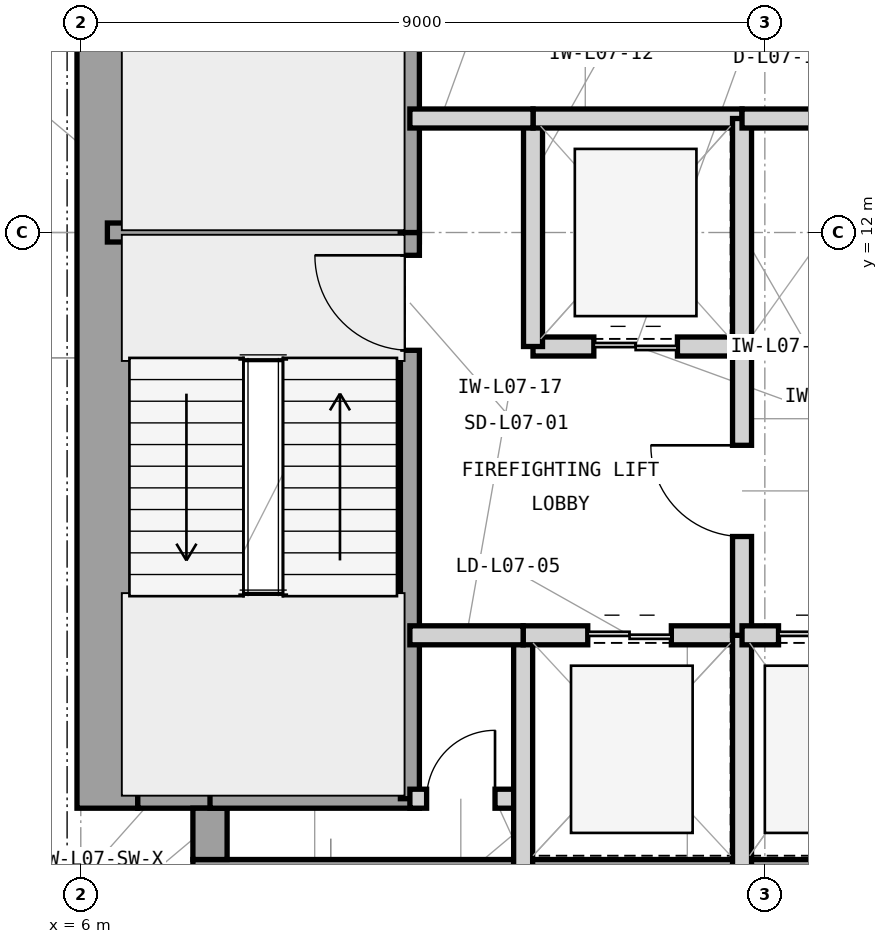
"""IFC4 building model, lengths in metres.
Left out: names, types, materials, properties, quantities, classifications, styles, units other than length and angle.
Written with IfcOpenShell. Run it as: python <this file> out.ifc"""

import sys

from ifc_helpers import new_model, si_unit, direction, frame, frame_2d, origin, place, context, subcontext, project, spatial, rectangle, extrude, element, fill, save


model = new_model("IFC4")
c1 = context("Model", 3, precision=1e-05, world=origin(), true_north=direction((0.0, 1.0)))
c2 = subcontext(c1, "Body", "Model", "MODEL_VIEW")
j1 = project(units=[si_unit("LENGTHUNIT", "METRE"), si_unit("PLANEANGLEUNIT", "RADIAN")], contexts=[c1])
p1 = place(None, origin())
s1 = spatial("IfcSite", under=j1, at=p1, CompositionType="ELEMENT")
p2 = place(p1, origin())
s2 = spatial("IfcBuilding", under=s1, at=p2, CompositionType="ELEMENT")
p3 = place(p2, frame((0.0, 0.0, 34.2)))
s3 = spatial("IfcBuildingStorey", under=s2, at=p3, CompositionType="ELEMENT", Elevation=34.2)
p4 = place(p3, frame((7.475, 3.35, 0.0), z_axis=(0.0, 0.0, 1.0), x_axis=(1.0, 0.0, 0.0)))
e1 = element("IfcWall", 1, at=p4, inside=s3, PredefinedType="SHEAR", context=c2, shape_type="SweptSolid", body=[
    extrude(rectangle(XDim=16.575, YDim=0.8, at=frame_2d((8.288, 0.0))), origin(), (0.0, 0.0, 1.0), 4.2),
])
p5 = place(p3, frame((6.35, 4.425, 0.0), z_axis=(0.0, 0.0, 1.0), x_axis=(0.0, 1.0, 0.0)))
e2 = element("IfcWall", 2, at=p5, inside=s3, PredefinedType="SHEAR", context=c2, shape_type="SweptSolid", body=[
    extrude(rectangle(XDim=15.15, YDim=0.8, at=frame_2d((7.575, 0.0))), origin(), (0.0, 0.0, 1.0), 4.2),
])
p6 = place(p3, frame((6.75, 4.65, 0.0), z_axis=(0.0, 0.0, 1.0), x_axis=(1.0, 0.0, 0.0)))
e3 = element("IfcWall", 3, at=p6, inside=s3, PredefinedType="SHEAR", context=c2, shape_type="SweptSolid", body=[
    extrude(rectangle(XDim=1.175, YDim=0.45, at=frame_2d((0.587, 0.0))), origin(), (0.0, 0.0, 1.0), 4.2),
])
p7 = place(p3, frame((7.7, 3.75, 0.0), z_axis=(0.0, 0.0, 1.0), x_axis=(0.0, 1.0, 0.0)))
e4 = element("IfcWall", 4, at=p7, inside=s3, PredefinedType="SHEAR", context=c2, shape_type="SweptSolid", body=[
    extrude(rectangle(XDim=0.675, YDim=0.45, at=frame_2d((0.337, 0.0))), origin(), (0.0, 0.0, 1.0), 4.2),
])
p8 = place(p3, frame((6.35, 12.0, 0.0), z_axis=(0.0, 0.0, 1.0), x_axis=(1.0, 0.0, 0.0)))
e5 = element("IfcWall", 5, at=p8, inside=s3, PredefinedType="SHEAR", context=c2, shape_type="SweptSolid", body=[
    extrude(rectangle(XDim=4.105, YDim=0.25, at=frame_2d((2.052, 0.0))), origin(), (0.0, 0.0, 1.0), 4.2),
])
p9 = place(p3, frame((7.7, 4.55, 0.0), z_axis=(0.0, 0.0, 1.0), x_axis=(1.0, 0.0, 0.0)))
e6 = element("IfcWall", 6, at=p9, inside=s3, PredefinedType="SHEAR", context=c2, shape_type="SweptSolid", body=[
    extrude(rectangle(XDim=2.755, YDim=0.25, at=frame_2d((1.377, 0.0))), origin(), (0.0, 0.0, 1.0), 4.2),
])
p10 = place(p3, frame((10.33, 4.55, 0.0), z_axis=(0.0, 0.0, 1.0), x_axis=(0.0, 1.0, 0.0)))
e7 = element("IfcWall", 7, at=p10, inside=s3, PredefinedType="SHEAR", context=c2, shape_type="SweptSolid", body=[
    extrude(rectangle(XDim=7.45, YDim=0.25, at=frame_2d((3.725, 0.0))), origin(), (0.0, 0.0, 1.0), 4.2),
])
p11 = place(p10, frame((5.9, 0.0, 0.0)))
e8 = element("IfcOpeningElement", 8, at=p11, cuts=e7, PredefinedType="OPENING", context=c2, shape_type="SweptSolid", body=[
    extrude(rectangle(XDim=1.25, YDim=2.2, at=frame_2d((0.625, 1.1))), frame((0.0, 0.135, 0.0), z_axis=(0.0, -1.0, 0.0), x_axis=(1.0, 0.0, 0.0)), (0.0, 0.0, 1.0), 0.27),
])
p12 = place(p3, frame((10.33, 12.0, 0.0), z_axis=(0.0, 0.0, 1.0), x_axis=(0.0, 1.0, 0.0)))
e9 = element("IfcWall", 9, at=p12, inside=s3, PredefinedType="SHEAR", context=c2, shape_type="SweptSolid", body=[
    extrude(rectangle(XDim=7.45, YDim=0.25, at=frame_2d((3.725, 0.0))), origin(), (0.0, 0.0, 1.0), 4.2),
])
p13 = place(p12, frame((5.85, 0.0, 0.0)))
e10 = element("IfcOpeningElement", 10, at=p13, cuts=e9, PredefinedType="OPENING", context=c2, shape_type="SweptSolid", body=[
    extrude(rectangle(XDim=1.25, YDim=2.2, at=frame_2d((0.625, 1.1))), frame((0.0, 0.135, 0.0), z_axis=(0.0, -1.0, 0.0), x_axis=(1.0, 0.0, 0.0)), (0.0, 0.0, 1.0), 0.27),
])
p14 = place(p3, frame((10.33, 4.55, 0.0), z_axis=(0.0, 0.0, 1.0), x_axis=(1.0, 0.0, 0.0)))
e11 = element("IfcWall", 11, at=p14, inside=s3, PredefinedType="PARTITIONING", context=c2, shape_type="SweptSolid", body=[
    extrude(rectangle(XDim=1.49, YDim=0.25, at=frame_2d((0.745, 0.0))), origin(), (0.0, 0.0, 1.0), 3.97),
])
p15 = place(p14, frame((0.22, 0.0, 0.0)))
e12 = element("IfcOpeningElement", 12, at=p15, cuts=e11, PredefinedType="OPENING", context=c2, shape_type="SweptSolid", body=[
    extrude(rectangle(XDim=0.9, YDim=2.1, at=frame_2d((0.45, 1.05))), frame((0.0, 0.135, 0.0), z_axis=(0.0, -1.0, 0.0), x_axis=(1.0, 0.0, 0.0)), (0.0, 0.0, 1.0), 0.27),
])
p16 = place(p3, frame((11.82, 3.35, 0.0), z_axis=(0.0, 0.0, 1.0), x_axis=(0.0, 1.0, 0.0)))
e13 = element("IfcWall", 13, at=p16, inside=s3, PredefinedType="PARTITIONING", context=c2, shape_type="SweptSolid", body=[
    extrude(rectangle(XDim=3.35, YDim=0.25, at=frame_2d((1.675, 0.0))), origin(), (0.0, 0.0, 1.0), 3.97),
])
p17 = place(p3, frame((11.82, 6.7, 0.0), z_axis=(0.0, 0.0, 1.0), x_axis=(1.0, 0.0, 0.0)))
e14 = element("IfcWall", 14, at=p17, inside=s3, PredefinedType="PARTITIONING", context=c2, shape_type="SweptSolid", body=[
    extrude(rectangle(XDim=2.88, YDim=0.25, at=frame_2d((1.44, 0.0))), origin(), (0.0, 0.0, 1.0), 3.426),
])
p18 = place(p17, frame((0.85, 0.0, 0.0)))
e15 = element("IfcOpeningElement", 15, at=p18, cuts=e14, PredefinedType="OPENING", context=c2, shape_type="SweptSolid", body=[
    extrude(rectangle(XDim=1.1, YDim=2.25, at=frame_2d((0.55, 1.125))), frame((0.0, 0.135, 0.0), z_axis=(0.0, -1.0, 0.0), x_axis=(1.0, 0.0, 0.0)), (0.0, 0.0, 1.0), 0.27),
])
p19 = place(p3, frame((14.7, 3.35, 0.0), z_axis=(0.0, 0.0, 1.0), x_axis=(0.0, 1.0, 0.0)))
e16 = element("IfcWall", 16, at=p19, inside=s3, PredefinedType="PARTITIONING", context=c2, shape_type="SweptSolid", body=[
    extrude(rectangle(XDim=3.35, YDim=0.25, at=frame_2d((1.675, 0.0))), origin(), (0.0, 0.0, 1.0), 3.97),
])
p20 = place(p3, frame((11.95, 10.5, 0.0), z_axis=(0.0, 0.0, 1.0), x_axis=(1.0, 0.0, 0.0)))
e17 = element("IfcWall", 17, at=p20, inside=s3, PredefinedType="PARTITIONING", context=c2, shape_type="SweptSolid", body=[
    extrude(rectangle(XDim=2.75, YDim=0.25, at=frame_2d((1.375, 0.0))), origin(), (0.0, 0.0, 1.0), 3.426),
])
p21 = place(p20, frame((0.8, 0.0, 0.0)))
e18 = element("IfcOpeningElement", 18, at=p21, cuts=e17, PredefinedType="OPENING", context=c2, shape_type="SweptSolid", body=[
    extrude(rectangle(XDim=1.1, YDim=2.25, at=frame_2d((0.55, 1.125))), frame((0.0, 0.135, 0.0), z_axis=(0.0, -1.0, 0.0), x_axis=(1.0, 0.0, 0.0)), (0.0, 0.0, 1.0), 0.27),
])
p22 = place(p3, frame((11.95, 10.5, 0.0), z_axis=(0.0, 0.0, 1.0), x_axis=(0.0, 1.0, 0.0)))
e19 = element("IfcWall", 19, at=p22, inside=s3, PredefinedType="PARTITIONING", context=c2, shape_type="SweptSolid", body=[
    extrude(rectangle(XDim=3.0, YDim=0.25, at=frame_2d((1.5, 0.0))), origin(), (0.0, 0.0, 1.0), 3.97),
])
p23 = place(p3, frame((11.95, 13.5, 0.0), z_axis=(0.0, 0.0, 1.0), x_axis=(1.0, 0.0, 0.0)))
e20 = element("IfcWall", 20, at=p23, inside=s3, PredefinedType="PARTITIONING", context=c2, shape_type="SweptSolid", body=[
    extrude(rectangle(XDim=2.75, YDim=0.25, at=frame_2d((1.375, 0.0))), origin(), (0.0, 0.0, 1.0), 3.426),
])
p24 = place(p3, frame((14.7, 10.5, 0.0), z_axis=(0.0, 0.0, 1.0), x_axis=(0.0, 1.0, 0.0)))
e21 = element("IfcWall", 21, at=p24, inside=s3, PredefinedType="PARTITIONING", context=c2, shape_type="SweptSolid", body=[
    extrude(rectangle(XDim=3.0, YDim=0.25, at=frame_2d((1.5, 0.0))), origin(), (0.0, 0.0, 1.0), 3.97),
])
p25 = place(p3, frame((14.7, 6.7, 0.0), z_axis=(0.0, 0.0, 1.0), x_axis=(0.0, 1.0, 0.0)))
e22 = element("IfcWall", 22, at=p25, inside=s3, PredefinedType="PARTITIONING", context=c2, shape_type="SweptSolid", body=[
    extrude(rectangle(XDim=3.8, YDim=0.25, at=frame_2d((1.9, 0.0))), origin(), (0.0, 0.0, 1.0), 3.97),
])
p26 = place(p25, frame((1.3, 0.0, 0.0)))
e23 = element("IfcOpeningElement", 23, at=p26, cuts=e22, PredefinedType="OPENING", context=c2, shape_type="SweptSolid", body=[
    extrude(rectangle(XDim=1.2, YDim=2.2, at=frame_2d((0.6, 1.1))), frame((0.0, 0.135, 0.0), z_axis=(0.0, -1.0, 0.0), x_axis=(1.0, 0.0, 0.0)), (0.0, 0.0, 1.0), 0.27),
])
p27 = place(p3, frame((10.33, 13.5, 0.0), z_axis=(0.0, 0.0, 1.0), x_axis=(1.0, 0.0, 0.0)))
e24 = element("IfcWall", 24, at=p27, inside=s3, PredefinedType="PARTITIONING", context=c2, shape_type="SweptSolid", body=[
    extrude(rectangle(XDim=1.62, YDim=0.25, at=frame_2d((0.81, 0.0))), origin(), (0.0, 0.0, 1.0), 3.426),
])
p28 = place(p3, frame((10.33, 6.7, 0.0), z_axis=(0.0, 0.0, 1.0), x_axis=(1.0, 0.0, 0.0)))
e25 = element("IfcWall", 25, at=p28, inside=s3, PredefinedType="PARTITIONING", context=c2, shape_type="SweptSolid", body=[
    extrude(rectangle(XDim=1.49, YDim=0.25, at=frame_2d((0.745, 0.0))), origin(), (0.0, 0.0, 1.0), 3.426),
])
p29 = place(p3, frame((14.7, 6.7, 0.0), z_axis=(0.0, 0.0, 1.0), x_axis=(1.0, 0.0, 0.0)))
e26 = element("IfcWall", 26, at=p29, inside=s3, PredefinedType="PARTITIONING", context=c2, shape_type="SweptSolid", body=[
    extrude(rectangle(XDim=2.15, YDim=0.25, at=frame_2d((1.075, 0.0))), origin(), (0.0, 0.0, 1.0), 3.426),
])
p30 = place(p29, frame((0.48, 0.0, 0.0)))
e27 = element("IfcOpeningElement", 27, at=p30, cuts=e26, PredefinedType="OPENING", context=c2, shape_type="SweptSolid", body=[
    extrude(rectangle(XDim=1.15, YDim=2.25, at=frame_2d((0.575, 1.125))), frame((0.0, 0.135, 0.0), z_axis=(0.0, -1.0, 0.0), x_axis=(1.0, 0.0, 0.0)), (0.0, 0.0, 1.0), 0.27),
])
p31 = place(p3, frame((14.7, 10.5, 0.0), z_axis=(0.0, 0.0, 1.0), x_axis=(1.0, 0.0, 0.0)))
e28 = element("IfcWall", 28, at=p31, inside=s3, PredefinedType="PARTITIONING", context=c2, shape_type="SweptSolid", body=[
    extrude(rectangle(XDim=2.15, YDim=0.25, at=frame_2d((1.075, 0.0))), origin(), (0.0, 0.0, 1.0), 3.426),
])
p32 = place(p3, frame((14.7, 13.5, 0.0), z_axis=(0.0, 0.0, 1.0), x_axis=(1.0, 0.0, 0.0)))
e29 = element("IfcWall", 29, at=p32, inside=s3, PredefinedType="PARTITIONING", context=c2, shape_type="SweptSolid", body=[
    extrude(rectangle(XDim=8.95, YDim=0.25, at=frame_2d((4.475, 0.0))), origin(), (0.0, 0.0, 1.0), 3.426),
])
p33 = place(p11, origin())
e30 = element("IfcDoor", 30, at=p33, inside=s3, OperationType="SINGLE_SWING_RIGHT", PredefinedType="DOOR", context=c2, shape_type="SweptSolid", body=[
    extrude(rectangle(XDim=1.25, YDim=2.2, at=frame_2d((0.625, 1.1))), frame((0.0, 0.025, 0.0), z_axis=(0.0, -1.0, 0.0), x_axis=(1.0, 0.0, 0.0)), (0.0, 0.0, 1.0), 0.05),
])
fill(e8, e30)
p34 = place(p15, origin())
e31 = element("IfcDoor", 31, at=p34, inside=s3, OperationType="SINGLE_SWING_RIGHT", PredefinedType="TRAPDOOR", context=c2, shape_type="SweptSolid", body=[
    extrude(rectangle(XDim=0.9, YDim=2.1, at=frame_2d((0.45, 1.05))), frame((0.0, 0.025, 0.0), z_axis=(0.0, -1.0, 0.0), x_axis=(1.0, 0.0, 0.0)), (0.0, 0.0, 1.0), 0.05),
])
fill(e12, e31)
p35 = place(p18, origin())
e32 = element("IfcDoor", 32, at=p35, inside=s3, OperationType="DOUBLE_DOOR_SLIDING", PredefinedType="DOOR", context=c2, shape_type="SweptSolid", body=[
    extrude(rectangle(XDim=1.1, YDim=2.25, at=frame_2d((0.55, 1.125))), frame((0.0, 0.025, 0.0), z_axis=(0.0, -1.0, 0.0), x_axis=(1.0, 0.0, 0.0)), (0.0, 0.0, 1.0), 0.05),
])
fill(e15, e32)
p36 = place(p21, origin())
e33 = element("IfcDoor", 33, at=p36, inside=s3, OperationType="DOUBLE_DOOR_SLIDING", PredefinedType="DOOR", context=c2, shape_type="SweptSolid", body=[
    extrude(rectangle(XDim=1.1, YDim=2.25, at=frame_2d((0.55, 1.125))), frame((0.0, 0.025, 0.0), z_axis=(0.0, -1.0, 0.0), x_axis=(1.0, 0.0, 0.0)), (0.0, 0.0, 1.0), 0.05),
])
fill(e18, e33)
p37 = place(p26, origin())
e34 = element("IfcDoor", 34, at=p37, inside=s3, OperationType="SINGLE_SWING_RIGHT", PredefinedType="DOOR", context=c2, shape_type="SweptSolid", body=[
    extrude(rectangle(XDim=1.2, YDim=2.2, at=frame_2d((0.6, 1.1))), frame((0.0, 0.025, 0.0), z_axis=(0.0, -1.0, 0.0), x_axis=(1.0, 0.0, 0.0)), (0.0, 0.0, 1.0), 0.05),
])
fill(e23, e34)
p38 = place(p30, origin())
e35 = element("IfcDoor", 35, at=p38, inside=s3, OperationType="DOUBLE_DOOR_SLIDING", PredefinedType="DOOR", context=c2, shape_type="SweptSolid", body=[
    extrude(rectangle(XDim=1.15, YDim=2.25, at=frame_2d((0.575, 1.125))), frame((0.0, 0.025, 0.0), z_axis=(0.0, -1.0, 0.0), x_axis=(1.0, 0.0, 0.0)), (0.0, 0.0, 1.0), 0.05),
])
fill(e27, e35)
save(model, sys.argv[1])
